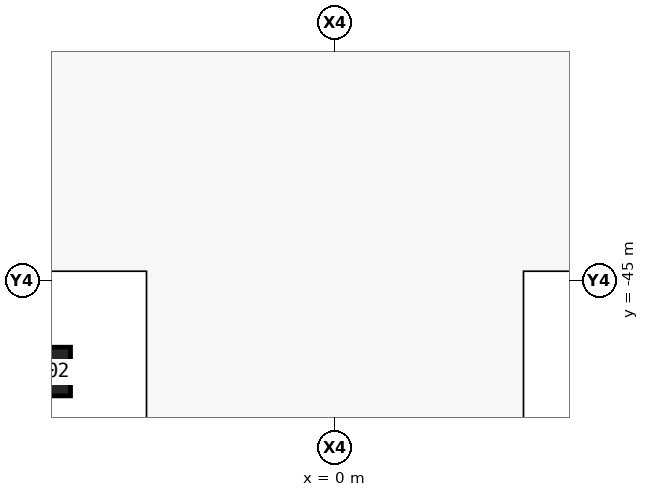
"""IFC4 building model, lengths in metres.
Left out: names, types, materials, properties, quantities, classifications, styles, units other than length and angle.
Written with IfcOpenShell. Run it as: python <this file> out.ifc"""

import sys

from ifc_helpers import new_model, si_unit, direction, frame, origin, origin_2d, place, context, subcontext, project, spatial, rectangle, extrude, element, save


model = new_model("IFC4")
c1 = context("Model", 3, precision=1e-05, world=origin(), true_north=direction((0.0, 1.0)))
c2 = subcontext(c1, "Body", "Model", "MODEL_VIEW")
j1 = project(units=[si_unit("LENGTHUNIT", "METRE"), si_unit("PLANEANGLEUNIT", "RADIAN")], contexts=[c1])
p1 = place(None, origin())
s1 = spatial("IfcSite", under=j1, at=p1, CompositionType="ELEMENT")
p2 = place(p1, origin())
s2 = spatial("IfcBuilding", under=s1, at=p2, CompositionType="ELEMENT")
p3 = place(p2, frame((0.0, 0.0, -9.0)))
s3 = spatial("IfcBuildingStorey", under=s2, at=p3, CompositionType="ELEMENT", Elevation=-9.0)
p4 = place(p3, frame((-9.5, -48.0, 0.0), z_axis=(0.0, 0.0, 1.0), x_axis=(1.0, 0.0, 0.0)))
e1 = element("IfcColumn", 1, at=p4, inside=s3, PredefinedType="COLUMN", context=c2, shape_type="SweptSolid", body=[
    extrude(rectangle(XDim=1.6, YDim=1.6, at=origin_2d()), origin(), (0.0, 0.0, 1.0), 4.5),
])
save(model, sys.argv[1])
